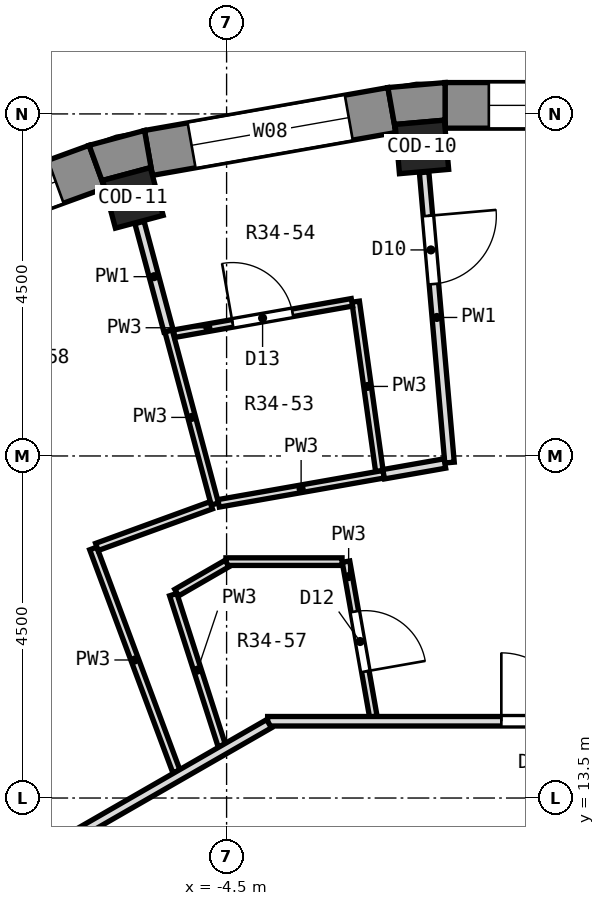
"""IFC4 building model, lengths in metres.
Left out: names, types, materials, properties, quantities, classifications, styles, units other than length and angle.
Written with IfcOpenShell. Run it as: python <this file> out.ifc"""

import sys

from ifc_helpers import new_model, si_unit, direction, frame, frame_2d, origin, origin_2d, place, context, subcontext, project, spatial, polyline, rectangle, outline, extrude, element, fill, save


model = new_model("IFC4")
c1 = context("Model", 3, precision=1e-05, world=origin(), true_north=direction((0.0, 1.0)))
c2 = subcontext(c1, "Body", "Model", "MODEL_VIEW")
j1 = project(units=[si_unit("LENGTHUNIT", "METRE"), si_unit("PLANEANGLEUNIT", "RADIAN")], contexts=[c1])
p1 = place(None, origin())
s1 = spatial("IfcSite", under=j1, at=p1, CompositionType="ELEMENT")
p2 = place(p1, origin())
s2 = spatial("IfcBuilding", under=s1, at=p2, CompositionType="ELEMENT")
p3 = place(p2, frame((0.0, 0.0, 239.6)))
s3 = spatial("IfcBuildingStorey", under=s2, at=p3, CompositionType="ELEMENT", Elevation=239.6)
for number, where, z_axis, x_axis in (
    (1, (-1.93, 22.066, 0.0), (0.0, 0.0, 1.0), (-0.087, 0.996, 0.0)),
    (2, (-5.733, 21.395, 0.0), (0.0, 0.0, 1.0), (-0.259, 0.966, 0.0)),
):
    element("IfcColumn", number, at=place(p3, frame(where, z_axis=z_axis, x_axis=x_axis)), inside=s3, PredefinedType="COLUMN", context=c2, shape_type="SweptSolid", body=[
        extrude(rectangle(XDim=0.65, YDim=0.65, at=origin_2d()), origin(), (0.0, 0.0, 1.0), 3.3),
    ])
p4 = place(p3, frame((1.626, 22.613, 0.0), z_axis=(0.0, 0.0, 1.0), x_axis=(-1.0, 0.0, 0.0)))
e3 = element("IfcWall", 3, at=p4, inside=s3, PredefinedType="SOLIDWALL", context=c2, shape_type="SweptSolid", body=[
    extrude(rectangle(XDim=3.251, YDim=0.6, at=frame_2d((1.626, 0.0))), origin(), (0.0, 0.0, 1.0), 2.9),
])
p5 = place(p4, frame((0.576, 0.0, 0.9)))
e4 = element("IfcOpeningElement", 4, at=p5, cuts=e3, PredefinedType="OPENING", context=c2, shape_type="SweptSolid", body=[
    extrude(rectangle(XDim=2.1, YDim=1.8, at=frame_2d((1.05, 0.9))), frame((0.0, 0.312, 0.0), z_axis=(0.0, -1.0, 0.0), x_axis=(1.0, 0.0, 0.0)), (0.0, 0.0, 1.0), 0.624),
])
p6 = place(p3, frame((-2.325, 22.551, 0.0), z_axis=(0.0, 0.0, 1.0), x_axis=(-0.984806225186, -0.173656842178, 0.0)))
e5 = element("IfcWall", 5, at=p6, inside=s3, PredefinedType="SOLIDWALL", context=c2, shape_type="SweptSolid", body=[
    extrude(rectangle(XDim=3.252, YDim=0.6, at=frame_2d((1.626, 0.0))), origin(), (0.0, 0.0, 1.0), 2.9),
])
p7 = place(p6, frame((0.576, 0.0, 0.9)))
e6 = element("IfcOpeningElement", 6, at=p7, cuts=e5, PredefinedType="OPENING", context=c2, shape_type="SweptSolid", body=[
    extrude(rectangle(XDim=2.1, YDim=1.8, at=frame_2d((1.05, 0.9))), frame((0.0, 0.312, 0.0), z_axis=(0.0, -1.0, 0.0), x_axis=(1.0, 0.0, 0.0)), (0.0, 0.0, 1.0), 0.624),
])
p8 = place(p3, frame((-6.206, 21.805, 0.0), z_axis=(0.0, 0.0, 1.0), x_axis=(-0.939679383794, -0.342056509473, 0.0)))
e7 = element("IfcWall", 7, at=p8, inside=s3, PredefinedType="SOLIDWALL", context=c2, shape_type="SweptSolid", body=[
    extrude(rectangle(XDim=3.252, YDim=0.6, at=frame_2d((1.626, 0.0))), origin(), (0.0, 0.0, 1.0), 2.9),
])
p9 = place(p8, frame((0.576, 0.0, 0.9)))
e8 = element("IfcOpeningElement", 8, at=p9, cuts=e7, PredefinedType="OPENING", context=c2, shape_type="SweptSolid", body=[
    extrude(rectangle(XDim=2.1, YDim=1.8, at=frame_2d((1.05, 0.9))), frame((0.0, 0.312, 0.0), z_axis=(0.0, -1.0, 0.0), x_axis=(1.0, 0.0, 0.0)), (0.0, 0.0, 1.0), 0.624),
])
p10 = place(p3, origin())
e9 = element("IfcWall", 9, at=p10, inside=s3, PredefinedType="SOLIDWALL", context=c2, shape_type="SweptSolid", body=[
    extrude(outline(polyline([(-1.626, 22.913), (-2.378, 22.847), (-2.273, 22.256), (-2.283, 22.361), (-1.635, 22.418), (-1.626, 22.312), (-1.626, 22.913)])), origin(), (0.0, 0.0, 1.0), 2.9),
])
p11 = place(p3, origin())
e10 = element("IfcWall", 10, at=p11, inside=s3, PredefinedType="SOLIDWALL", context=c2, shape_type="SweptSolid", body=[
    extrude(outline(polyline([(-6.309, 22.087), (-6.104, 21.523), (-6.131, 21.625), (-5.503, 21.793), (-5.476, 21.691), (-5.58, 22.282), (-6.309, 22.087)])), origin(), (0.0, 0.0, 1.0), 2.9),
])
p12 = place(p3, frame((-1.901, 21.732, 0.0), z_axis=(0.0, 0.0, 1.0), x_axis=(0.087187491268, -0.996191919946, 0.0)))
e11 = element("IfcWall", 11, at=p12, inside=s3, PredefinedType="PARTITIONING", context=c2, shape_type="SweptSolid", body=[
    extrude(rectangle(XDim=3.833, YDim=0.125, at=frame_2d((1.917, 0.0))), origin(), (0.0, 0.0, 1.0), 2.9),
])
p13 = place(p12, frame((0.575, 0.0, 0.0)))
e12 = element("IfcOpeningElement", 12, at=p13, cuts=e11, PredefinedType="OPENING", context=c2, shape_type="SweptSolid", body=[
    extrude(rectangle(XDim=0.9, YDim=2.1, at=frame_2d((0.45, 1.05))), frame((0.0, 0.074, 0.0), z_axis=(0.0, -1.0, 0.0), x_axis=(1.0, 0.0, 0.0)), (0.0, 0.0, 1.0), 0.149),
])
p14 = place(p3, frame((-2.802, 20.03, 0.0), z_axis=(0.0, 0.0, 1.0), x_axis=(0.138596789885, -0.990348892983, 0.0)))
e13 = element("IfcWall", 13, at=p14, inside=s3, PredefinedType="PARTITIONING", context=c2, shape_type="SweptSolid", body=[
    extrude(rectangle(XDim=2.251, YDim=0.1, at=frame_2d((1.125, 0.0))), origin(), (0.0, 0.0, 1.0), 2.9),
])
p15 = place(p3, frame((-2.929, 16.61, 0.0), z_axis=(0.0, 0.0, 1.0), x_axis=(0.173496006764, -0.984834572726, 0.0)))
e14 = element("IfcWall", 14, at=p15, inside=s3, PredefinedType="PARTITIONING", context=c2, shape_type="SweptSolid", body=[
    extrude(rectangle(XDim=2.07, YDim=0.1, at=frame_2d((1.035, 0.0))), origin(), (0.0, 0.0, 1.0), 2.9),
])
p16 = place(p15, frame((0.667, 0.0, 0.0)))
e15 = element("IfcOpeningElement", 15, at=p16, cuts=e14, PredefinedType="OPENING", context=c2, shape_type="SweptSolid", body=[
    extrude(rectangle(XDim=0.8, YDim=2.1, at=frame_2d((0.4, 1.05))), frame((0.0, 0.062, 0.0), z_axis=(0.0, -1.0, 0.0), x_axis=(1.0, 0.0, 0.0)), (0.0, 0.0, 1.0), 0.124),
])
p17 = place(p3, frame((-5.264, 19.646, 0.0), z_axis=(0.0, 0.0, 1.0), x_axis=(0.258480811352, -0.966016392285, 0.0)))
e16 = element("IfcWall", 16, at=p17, inside=s3, PredefinedType="PARTITIONING", context=c2, shape_type="SweptSolid", body=[
    extrude(rectangle(XDim=2.358, YDim=0.1, at=frame_2d((1.179, 0.0))), origin(), (0.0, 0.0, 1.0), 2.9),
])
p18 = place(p3, frame((-5.646, 21.072, 0.0), z_axis=(0.0, 0.0, 1.0), x_axis=(0.258887675069, -0.965907434332, 0.0)))
e17 = element("IfcWall", 17, at=p18, inside=s3, PredefinedType="PARTITIONING", context=c2, shape_type="SweptSolid", body=[
    extrude(rectangle(XDim=1.476, YDim=0.125, at=frame_2d((0.738, 0.0))), origin(), (0.0, 0.0, 1.0), 2.9),
])
p19 = place(p3, frame((-5.202, 16.176, 0.0), z_axis=(0.0, 0.0, 1.0), x_axis=(0.305778015567, -0.95210283331, 0.0)))
e18 = element("IfcWall", 18, at=p19, inside=s3, PredefinedType="PARTITIONING", context=c2, shape_type="SweptSolid", body=[
    extrude(rectangle(XDim=2.085, YDim=0.1, at=frame_2d((1.043, 0.0))), origin(), (0.0, 0.0, 1.0), 2.9),
])
p20 = place(p3, frame((-6.254, 16.783, 0.0), z_axis=(0.0, 0.0, 1.0), x_axis=(0.349354612584, -0.936990584086, 0.0)))
e19 = element("IfcWall", 19, at=p20, inside=s3, PredefinedType="PARTITIONING", context=c2, shape_type="SweptSolid", body=[
    extrude(rectangle(XDim=3.132, YDim=0.1, at=frame_2d((1.566, 0.0))), origin(), (0.0, 0.0, 1.0), 2.9),
])
p21 = place(p3, frame((-3.96, 14.51, 0.0), z_axis=(0.0, 0.0, 1.0), x_axis=(1.0, 0.0, 0.0)))
e20 = element("IfcWall", 20, at=p21, inside=s3, PredefinedType="PARTITIONING", context=c2, shape_type="SweptSolid", body=[
    extrude(rectangle(XDim=7.785, YDim=0.125, at=frame_2d((3.892, 0.0))), origin(), (0.0, 0.0, 1.0), 2.9),
])
p22 = place(p21, frame((4.125, 0.0, 0.0)))
e21 = element("IfcOpeningElement", 21, at=p22, cuts=e20, PredefinedType="OPENING", context=c2, shape_type="SweptSolid", body=[
    extrude(rectangle(XDim=1.0, YDim=2.1, at=frame_2d((0.5, 1.05))), frame((0.0, 0.074, 0.0), z_axis=(0.0, -1.0, 0.0), x_axis=(1.0, 0.0, 0.0)), (0.0, 0.0, 1.0), 0.149),
])
p23 = place(p21, frame((3.075, 0.0, 0.0)))
e22 = element("IfcOpeningElement", 22, at=p23, cuts=e20, PredefinedType="OPENING", context=c2, shape_type="SweptSolid", body=[
    extrude(rectangle(XDim=0.9, YDim=2.1, at=frame_2d((0.45, 1.05))), frame((0.0, 0.074, 0.0), z_axis=(0.0, -1.0, 0.0), x_axis=(1.0, 0.0, 0.0)), (0.0, 0.0, 1.0), 0.149),
])
p24 = place(p3, frame((-4.509, 16.61, 0.0), z_axis=(0.0, 0.0, 1.0), x_axis=(1.0, 0.0, 0.0)))
e23 = element("IfcWall", 23, at=p24, inside=s3, PredefinedType="PARTITIONING", context=c2, shape_type="SweptSolid", body=[
    extrude(rectangle(XDim=1.528, YDim=0.1, at=frame_2d((0.764, 0.0))), origin(), (0.0, 0.0, 1.0), 2.9),
])
p25 = place(p3, frame((-4.605, 17.377, 0.0), z_axis=(0.0, 0.0, 1.0), x_axis=(0.984786903427, 0.173766380058, 0.0)))
e24 = element("IfcWall", 24, at=p25, inside=s3, PredefinedType="PARTITIONING", context=c2, shape_type="SweptSolid", body=[
    extrude(rectangle(XDim=2.204, YDim=0.1, at=frame_2d((1.102, 0.0))), origin(), (0.0, 0.0, 1.0), 2.9),
])
p26 = place(p3, frame((-2.434, 17.76, 0.0), z_axis=(0.0, 0.0, 1.0), x_axis=(0.98493650749, 0.172916385032, 0.0)))
e25 = element("IfcWall", 25, at=p26, inside=s3, PredefinedType="PARTITIONING", context=c2, shape_type="SweptSolid", body=[
    extrude(rectangle(XDim=0.817, YDim=0.125, at=frame_2d((0.409, 0.0))), origin(), (0.0, 0.0, 1.0), 2.9),
])
p27 = place(p3, frame((-5.189, 19.609, 0.0), z_axis=(0.0, 0.0, 1.0), x_axis=(0.984802186768, 0.173679742451, 0.0)))
e26 = element("IfcWall", 26, at=p27, inside=s3, PredefinedType="PARTITIONING", context=c2, shape_type="SweptSolid", body=[
    extrude(rectangle(XDim=2.374, YDim=0.1, at=frame_2d((1.187, 0.0))), origin(), (0.0, 0.0, 1.0), 2.9),
])
p28 = place(p27, frame((0.781, 0.0, 0.0)))
e27 = element("IfcOpeningElement", 27, at=p28, cuts=e26, PredefinedType="OPENING", context=c2, shape_type="SweptSolid", body=[
    extrude(rectangle(XDim=0.8, YDim=2.1, at=frame_2d((0.4, 1.05))), frame((0.0, 0.062, 0.0), z_axis=(0.0, -1.0, 0.0), x_axis=(1.0, 0.0, 0.0)), (0.0, 0.0, 1.0), 0.124),
])
p29 = place(p3, frame((-6.206, 16.803, 0.0), z_axis=(0.0, 0.0, 1.0), x_axis=(0.939561559708, 0.342380016237, 0.0)))
e28 = element("IfcWall", 28, at=p29, inside=s3, PredefinedType="PARTITIONING", context=c2, shape_type="SweptSolid", body=[
    extrude(rectangle(XDim=1.6, YDim=0.1, at=frame_2d((0.8, 0.0))), origin(), (0.0, 0.0, 1.0), 2.9),
])
p30 = place(p3, frame((-10.573, 10.662, 0.0), z_axis=(0.0, 0.0, 1.0), x_axis=(0.866792171996, 0.498669560497, 0.0)))
e29 = element("IfcWall", 29, at=p30, inside=s3, PredefinedType="PARTITIONING", context=c2, shape_type="SweptSolid", body=[
    extrude(rectangle(XDim=7.651, YDim=0.125, at=frame_2d((3.825, 0.0))), origin(), (0.0, 0.0, 1.0), 2.9),
])
p31 = place(p3, frame((-5.157, 16.202, 0.0), z_axis=(0.0, 0.0, 1.0), x_axis=(0.865797482265, 0.500394564022, 0.0)))
e30 = element("IfcWall", 30, at=p31, inside=s3, PredefinedType="PARTITIONING", context=c2, shape_type="SweptSolid", body=[
    extrude(rectangle(XDim=0.765, YDim=0.1, at=frame_2d((0.383, 0.0))), origin(), (0.0, 0.0, 1.0), 2.9),
])
p32 = place(p5, origin())
e31 = element("IfcWindow", 31, at=p32, inside=s3, PartitioningType="SINGLE_PANEL", PredefinedType="WINDOW", context=c2, shape_type="SweptSolid", body=[
    extrude(rectangle(XDim=2.1, YDim=1.8, at=frame_2d((1.05, 0.9))), frame((0.0, 0.18, 0.0), z_axis=(0.0, -1.0, 0.0), x_axis=(1.0, 0.0, 0.0)), (0.0, 0.0, 1.0), 0.06),
])
fill(e4, e31)
p33 = place(p7, origin())
e32 = element("IfcWindow", 32, at=p33, inside=s3, PartitioningType="SINGLE_PANEL", PredefinedType="WINDOW", context=c2, shape_type="SweptSolid", body=[
    extrude(rectangle(XDim=2.1, YDim=1.8, at=frame_2d((1.05, 0.9))), frame((0.0, 0.18, 0.0), z_axis=(0.0, -1.0, 0.0), x_axis=(1.0, 0.0, 0.0)), (0.0, 0.0, 1.0), 0.06),
])
fill(e6, e32)
p34 = place(p9, origin())
e33 = element("IfcWindow", 33, at=p34, inside=s3, PartitioningType="SINGLE_PANEL", PredefinedType="WINDOW", context=c2, shape_type="SweptSolid", body=[
    extrude(rectangle(XDim=2.1, YDim=1.8, at=frame_2d((1.05, 0.9))), frame((0.0, 0.18, 0.0), z_axis=(0.0, -1.0, 0.0), x_axis=(1.0, 0.0, 0.0)), (0.0, 0.0, 1.0), 0.06),
])
fill(e8, e33)
p35 = place(p23, origin())
e34 = element("IfcDoor", 34, at=p35, inside=s3, OperationType="SINGLE_SWING_LEFT", PredefinedType="DOOR", context=c2, shape_type="SweptSolid", body=[
    extrude(rectangle(XDim=0.9, YDim=2.1, at=frame_2d((0.45, 1.05))), frame((0.0, 0.025, 0.0), z_axis=(0.0, -1.0, 0.0), x_axis=(1.0, 0.0, 0.0)), (0.0, 0.0, 1.0), 0.05),
])
fill(e22, e34)
p36 = place(p13, origin())
e35 = element("IfcDoor", 35, at=p36, inside=s3, OperationType="SINGLE_SWING_LEFT", PredefinedType="DOOR", context=c2, shape_type="SweptSolid", body=[
    extrude(rectangle(XDim=0.9, YDim=2.1, at=frame_2d((0.45, 1.05))), frame((0.0, 0.025, 0.0), z_axis=(0.0, -1.0, 0.0), x_axis=(1.0, 0.0, 0.0)), (0.0, 0.0, 1.0), 0.05),
])
fill(e12, e35)
p37 = place(p16, origin())
e36 = element("IfcDoor", 36, at=p37, inside=s3, OperationType="SINGLE_SWING_RIGHT", PredefinedType="DOOR", context=c2, shape_type="SweptSolid", body=[
    extrude(rectangle(XDim=0.8, YDim=2.1, at=frame_2d((0.4, 1.05))), frame((0.0, 0.025, 0.0), z_axis=(0.0, -1.0, 0.0), x_axis=(1.0, 0.0, 0.0)), (0.0, 0.0, 1.0), 0.05),
])
fill(e15, e36)
p38 = place(p28, origin())
e37 = element("IfcDoor", 37, at=p38, inside=s3, OperationType="SINGLE_SWING_LEFT", PredefinedType="DOOR", context=c2, shape_type="SweptSolid", body=[
    extrude(rectangle(XDim=0.8, YDim=2.1, at=frame_2d((0.4, 1.05))), frame((0.0, 0.025, 0.0), z_axis=(0.0, -1.0, 0.0), x_axis=(1.0, 0.0, 0.0)), (0.0, 0.0, 1.0), 0.05),
])
fill(e27, e37)
save(model, sys.argv[1])
